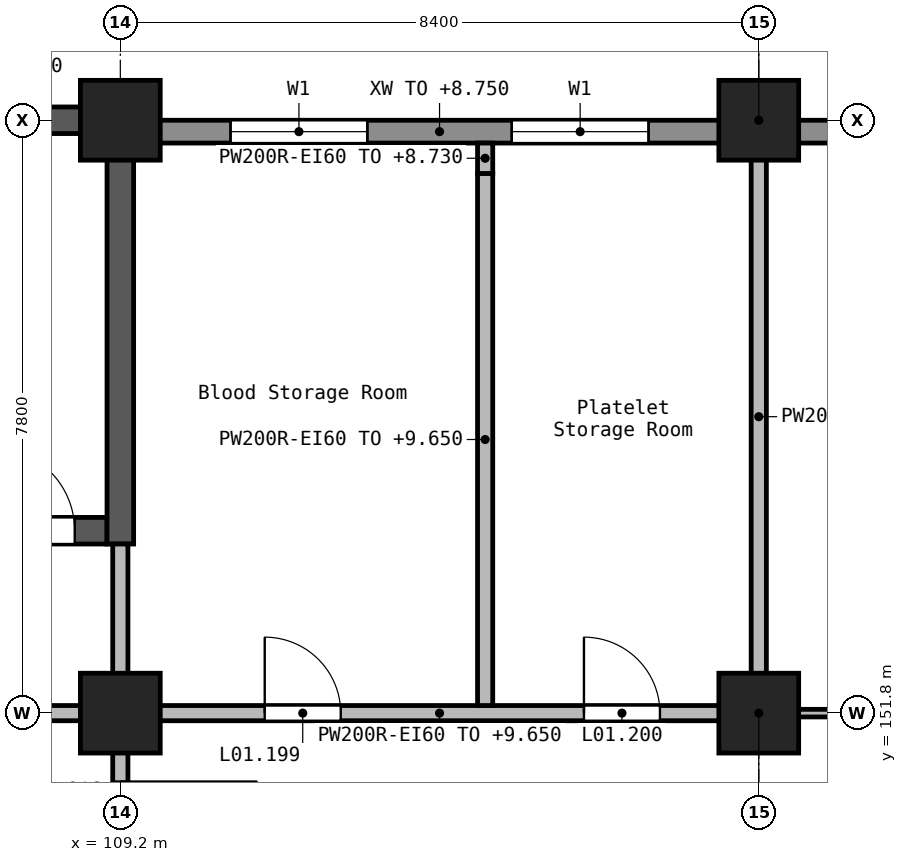
"""IFC4 building model, lengths in metres.
Left out: names, types, materials, properties, quantities, classifications, styles, units other than length and angle.
Written with IfcOpenShell. Run it as: python <this file> out.ifc"""

import sys

from ifc_helpers import new_model, si_unit, direction, frame, frame_2d, origin, origin_2d, place, context, subcontext, project, spatial, rectangle, extrude, element, fill, save


model = new_model("IFC4")
c1 = context("Model", 3, precision=1e-05, world=origin(), true_north=direction((0.0, 1.0)))
c2 = subcontext(c1, "Body", "Model", "MODEL_VIEW")
j1 = project(units=[si_unit("LENGTHUNIT", "METRE"), si_unit("PLANEANGLEUNIT", "RADIAN")], contexts=[c1])
p1 = place(None, origin())
s1 = spatial("IfcSite", under=j1, at=p1, CompositionType="ELEMENT")
p2 = place(p1, origin())
s2 = spatial("IfcBuilding", under=s1, at=p2, CompositionType="ELEMENT")
p3 = place(p2, frame((0.0, 0.0, 5.4)))
s3 = spatial("IfcBuildingStorey", under=s2, at=p3, CompositionType="ELEMENT", Elevation=5.4)
for number, where, z_axis, x_axis in (
    (1, (109.2, 151.8, 0.0), (0.0, 0.0, 1.0), (1.0, 0.0, 0.0)),
    (2, (109.2, 159.6, 0.0), (0.0, 0.0, 1.0), (1.0, 0.0, 0.0)),
    (3, (117.6, 151.8, 0.0), (0.0, 0.0, 1.0), (1.0, 0.0, 0.0)),
    (4, (117.6, 159.6, 0.0), (0.0, 0.0, 1.0), (1.0, 0.0, 0.0)),
):
    element("IfcColumn", number, at=place(p3, frame(where, z_axis=z_axis, x_axis=x_axis)), inside=s3, PredefinedType="COLUMN", context=c2, shape_type="SweptSolid", body=[
        extrude(rectangle(XDim=1.05, YDim=1.05, at=origin_2d()), origin(), (0.0, 0.0, 1.0), 4.5),
    ])
p4 = place(p3, frame((100.625, 159.6, 0.0), z_axis=(0.0, 0.0, 1.0), x_axis=(1.0, 0.0, 0.0)))
e5 = element("IfcWall", 5, at=p4, inside=s3, PredefinedType="SHEAR", context=c2, shape_type="SweptSolid", body=[
    extrude(rectangle(XDim=8.4, YDim=0.35, at=frame_2d((4.2, 0.0))), origin(), (0.0, 0.0, 1.0), 4.5),
])
p5 = place(p3, frame((100.975, 154.2, 0.0), z_axis=(0.0, 0.0, 1.0), x_axis=(1.0, 0.0, 0.0)))
e6 = element("IfcWall", 6, at=p5, inside=s3, PredefinedType="SHEAR", context=c2, shape_type="SweptSolid", body=[
    extrude(rectangle(XDim=8.05, YDim=0.35, at=frame_2d((4.025, 0.0))), origin(), (0.0, 0.0, 1.0), 4.5),
])
p6 = place(p5, frame((6.525, 0.0, 0.0)))
e7 = element("IfcOpeningElement", 7, at=p6, cuts=e6, PredefinedType="OPENING", context=c2, shape_type="SweptSolid", body=[
    extrude(rectangle(XDim=1.1, YDim=2.1, at=frame_2d((0.55, 1.05))), frame((0.0, 0.185, 0.0), z_axis=(0.0, -1.0, 0.0), x_axis=(1.0, 0.0, 0.0)), (0.0, 0.0, 1.0), 0.37),
])
p7 = place(p3, frame((109.2, 154.025, 0.0), z_axis=(0.0, 0.0, 1.0), x_axis=(0.0, 1.0, 0.0)))
e8 = element("IfcWall", 8, at=p7, inside=s3, PredefinedType="SHEAR", context=c2, shape_type="SweptSolid", body=[
    extrude(rectangle(XDim=5.75, YDim=0.35, at=frame_2d((2.875, 0.0))), origin(), (0.0, 0.0, 1.0), 4.5),
])
p8 = place(p3, frame((125.5, 159.45, 0.0), z_axis=(0.0, 0.0, 1.0), x_axis=(-1.0, 0.0, 0.0)))
e9 = element("IfcWall", 9, at=p8, inside=s3, PredefinedType="STANDARD", context=c2, shape_type="SweptSolid", body=[
    extrude(rectangle(XDim=7.4, YDim=0.3, at=frame_2d((3.7, 0.0))), origin(), (0.0, 0.0, 1.0), 3.35),
])
p9 = place(p8, frame((0.95, 0.0, 0.9)))
e10 = element("IfcOpeningElement", 10, at=p9, cuts=e9, PredefinedType="OPENING", context=c2, shape_type="SweptSolid", body=[
    extrude(rectangle(XDim=1.8, YDim=1.5, at=frame_2d((0.9, 0.75))), frame((0.0, 0.16, 0.0), z_axis=(0.0, -1.0, 0.0), x_axis=(1.0, 0.0, 0.0)), (0.0, 0.0, 1.0), 0.32),
])
p10 = place(p8, frame((4.65, 0.0, 0.9)))
e11 = element("IfcOpeningElement", 11, at=p10, cuts=e9, PredefinedType="OPENING", context=c2, shape_type="SweptSolid", body=[
    extrude(rectangle(XDim=1.8, YDim=1.5, at=frame_2d((0.9, 0.75))), frame((0.0, 0.16, 0.0), z_axis=(0.0, -1.0, 0.0), x_axis=(1.0, 0.0, 0.0)), (0.0, 0.0, 1.0), 0.32),
])
p11 = place(p3, frame((117.1, 159.45, 0.0), z_axis=(0.0, 0.0, 1.0), x_axis=(-1.0, 0.0, 0.0)))
e12 = element("IfcWall", 12, at=p11, inside=s3, PredefinedType="STANDARD", context=c2, shape_type="SweptSolid", body=[
    extrude(rectangle(XDim=7.4, YDim=0.3, at=frame_2d((3.7, 0.0))), origin(), (0.0, 0.0, 1.0), 3.35),
])
p12 = place(p11, frame((0.95, 0.0, 0.9)))
e13 = element("IfcOpeningElement", 13, at=p12, cuts=e12, PredefinedType="OPENING", context=c2, shape_type="SweptSolid", body=[
    extrude(rectangle(XDim=1.8, YDim=1.5, at=frame_2d((0.9, 0.75))), frame((0.0, 0.16, 0.0), z_axis=(0.0, -1.0, 0.0), x_axis=(1.0, 0.0, 0.0)), (0.0, 0.0, 1.0), 0.32),
])
p13 = place(p11, frame((4.65, 0.0, 0.9)))
e14 = element("IfcOpeningElement", 14, at=p13, cuts=e12, PredefinedType="OPENING", context=c2, shape_type="SweptSolid", body=[
    extrude(rectangle(XDim=1.8, YDim=1.5, at=frame_2d((0.9, 0.75))), frame((0.0, 0.16, 0.0), z_axis=(0.0, -1.0, 0.0), x_axis=(1.0, 0.0, 0.0)), (0.0, 0.0, 1.0), 0.32),
])
p14 = place(p3, frame((109.2, 154.025, 0.0), z_axis=(0.0, 0.0, 1.0), x_axis=(0.0, -1.0, 0.0)))
e15 = element("IfcWall", 15, at=p14, inside=s3, PredefinedType="SOLIDWALL", context=c2, shape_type="SweptSolid", body=[
    extrude(rectangle(XDim=1.725, YDim=0.2, at=frame_2d((0.862, 0.0))), origin(), (0.0, 0.0, 1.0), 4.25),
])
p15 = place(p3, frame((109.2, 151.3, 0.0), z_axis=(0.0, 0.0, 1.0), x_axis=(0.0, -1.0, 0.0)))
e16 = element("IfcWall", 16, at=p15, inside=s3, PredefinedType="SOLIDWALL", context=c2, shape_type="SweptSolid", body=[
    extrude(rectangle(XDim=2.6, YDim=0.2, at=frame_2d((1.3, 0.0))), origin(), (0.0, 0.0, 1.0), 4.25),
])
p16 = place(p15, frame((0.4, 0.0, 0.0)))
e17 = element("IfcOpeningElement", 17, at=p16, cuts=e16, PredefinedType="OPENING", context=c2, shape_type="SweptSolid", body=[
    extrude(rectangle(XDim=1.8, YDim=2.1, at=frame_2d((0.9, 1.05))), frame((0.0, 0.11, 0.0), z_axis=(0.0, -1.0, 0.0), x_axis=(1.0, 0.0, 0.0)), (0.0, 0.0, 1.0), 0.22),
])
p17 = place(p3, frame((101.3, 151.8, 0.0), z_axis=(0.0, 0.0, 1.0), x_axis=(1.0, 0.0, 0.0)))
e18 = element("IfcWall", 18, at=p17, inside=s3, PredefinedType="SOLIDWALL", context=c2, shape_type="SweptSolid", body=[
    extrude(rectangle(XDim=7.4, YDim=0.2, at=frame_2d((3.7, 0.0))), origin(), (0.0, 0.0, 1.0), 4.25),
])
p18 = place(p17, frame((3.15, 0.0, 0.0)))
e19 = element("IfcOpeningElement", 19, at=p18, cuts=e18, PredefinedType="OPENING", context=c2, shape_type="SweptSolid", body=[
    extrude(rectangle(XDim=1.1, YDim=2.1, at=frame_2d((0.55, 1.05))), frame((0.0, 0.11, 0.0), z_axis=(0.0, -1.0, 0.0), x_axis=(1.0, 0.0, 0.0)), (0.0, 0.0, 1.0), 0.22),
])
p19 = place(p3, frame((109.7, 151.8, 0.0), z_axis=(0.0, 0.0, 1.0), x_axis=(1.0, 0.0, 0.0)))
e20 = element("IfcWall", 20, at=p19, inside=s3, PredefinedType="SOLIDWALL", context=c2, shape_type="SweptSolid", body=[
    extrude(rectangle(XDim=7.4, YDim=0.2, at=frame_2d((3.7, 0.0))), origin(), (0.0, 0.0, 1.0), 4.25),
])
p20 = place(p19, frame((1.4, 0.0, 0.0)))
e21 = element("IfcOpeningElement", 21, at=p20, cuts=e20, PredefinedType="OPENING", context=c2, shape_type="SweptSolid", body=[
    extrude(rectangle(XDim=1.0, YDim=2.1, at=frame_2d((0.5, 1.05))), frame((0.0, 0.11, 0.0), z_axis=(0.0, -1.0, 0.0), x_axis=(1.0, 0.0, 0.0)), (0.0, 0.0, 1.0), 0.22),
])
p21 = place(p19, frame((5.6, 0.0, 0.0)))
e22 = element("IfcOpeningElement", 22, at=p21, cuts=e20, PredefinedType="OPENING", context=c2, shape_type="SweptSolid", body=[
    extrude(rectangle(XDim=1.0, YDim=2.1, at=frame_2d((0.5, 1.05))), frame((0.0, 0.11, 0.0), z_axis=(0.0, -1.0, 0.0), x_axis=(1.0, 0.0, 0.0)), (0.0, 0.0, 1.0), 0.22),
])
p22 = place(p3, frame((114.0, 151.9, 0.0), z_axis=(0.0, 0.0, 1.0), x_axis=(0.0, 1.0, 0.0)))
e23 = element("IfcWall", 23, at=p22, inside=s3, PredefinedType="SOLIDWALL", context=c2, shape_type="SweptSolid", body=[
    extrude(rectangle(XDim=7.0, YDim=0.2, at=frame_2d((3.5, 0.0))), origin(), (0.0, 0.0, 1.0), 4.25),
])
p23 = place(p3, frame((114.0, 158.9, 0.0), z_axis=(0.0, 0.0, 1.0), x_axis=(0.0, 1.0, 0.0)))
e24 = element("IfcWall", 24, at=p23, inside=s3, PredefinedType="SOLIDWALL", context=c2, shape_type="SweptSolid", body=[
    extrude(rectangle(XDim=0.4, YDim=0.2, at=frame_2d((0.2, 0.0))), origin(), (0.0, 0.0, 1.0), 3.33),
])
p24 = place(p3, frame((117.6, 152.3, 0.0), z_axis=(0.0, 0.0, 1.0), x_axis=(0.0, 1.0, 0.0)))
e25 = element("IfcWall", 25, at=p24, inside=s3, PredefinedType="SOLIDWALL", context=c2, shape_type="SweptSolid", body=[
    extrude(rectangle(XDim=6.8, YDim=0.2, at=frame_2d((3.4, 0.0))), origin(), (0.0, 0.0, 1.0), 4.25),
])
p25 = place(p3, frame((125.5, 151.8, 0.0), z_axis=(0.0, 0.0, 1.0), x_axis=(-1.0, 0.0, 0.0)))
e26 = element("IfcWall", 26, at=p25, inside=s3, PredefinedType="PARTITIONING", context=c2, shape_type="SweptSolid", body=[
    extrude(rectangle(XDim=7.4, YDim=0.1, at=frame_2d((3.7, 0.0))), origin(), (0.0, 0.0, 1.0), 4.25),
])
p26 = place(p25, frame((5.35, 0.0, 0.0)))
e27 = element("IfcOpeningElement", 27, at=p26, cuts=e26, PredefinedType="OPENING", context=c2, shape_type="SweptSolid", body=[
    extrude(rectangle(XDim=0.9, YDim=2.1, at=frame_2d((0.45, 1.05))), frame((0.0, 0.06, 0.0), z_axis=(0.0, -1.0, 0.0), x_axis=(1.0, 0.0, 0.0)), (0.0, 0.0, 1.0), 0.12),
])
p27 = place(p25, frame((0.1, 0.0, 0.0)))
e28 = element("IfcOpeningElement", 28, at=p27, cuts=e26, PredefinedType="OPENING", context=c2, shape_type="SweptSolid", body=[
    extrude(rectangle(XDim=1.8, YDim=2.1, at=frame_2d((0.9, 1.05))), frame((0.0, 0.06, 0.0), z_axis=(0.0, -1.0, 0.0), x_axis=(1.0, 0.0, 0.0)), (0.0, 0.0, 1.0), 0.12),
])
p28 = place(p12, origin())
e29 = element("IfcWindow", 29, at=p28, inside=s3, PartitioningType="SINGLE_PANEL", PredefinedType="WINDOW", context=c2, shape_type="SweptSolid", body=[
    extrude(rectangle(XDim=1.8, YDim=1.5, at=frame_2d((0.9, 0.75))), frame((0.0, 0.03, 0.0), z_axis=(0.0, -1.0, 0.0), x_axis=(1.0, 0.0, 0.0)), (0.0, 0.0, 1.0), 0.06),
])
fill(e13, e29)
p29 = place(p13, origin())
e30 = element("IfcWindow", 30, at=p29, inside=s3, PartitioningType="SINGLE_PANEL", PredefinedType="WINDOW", context=c2, shape_type="SweptSolid", body=[
    extrude(rectangle(XDim=1.8, YDim=1.5, at=frame_2d((0.9, 0.75))), frame((0.0, 0.03, 0.0), z_axis=(0.0, -1.0, 0.0), x_axis=(1.0, 0.0, 0.0)), (0.0, 0.0, 1.0), 0.06),
])
fill(e14, e30)
p30 = place(p16, frame((1.8, 0.0, 0.0), z_axis=(0.0, 0.0, 1.0), x_axis=(-1.0, 0.0, 0.0)))
e31 = element("IfcDoor", 31, at=p30, inside=s3, OperationType="DOUBLE_DOOR_SINGLE_SWING", PredefinedType="DOOR", context=c2, shape_type="SweptSolid", body=[
    extrude(rectangle(XDim=1.8, YDim=2.1, at=frame_2d((0.9, 1.05))), frame((0.0, 0.025, 0.0), z_axis=(0.0, -1.0, 0.0), x_axis=(1.0, 0.0, 0.0)), (0.0, 0.0, 1.0), 0.05),
])
fill(e17, e31)
p31 = place(p6, origin())
e32 = element("IfcDoor", 32, at=p31, inside=s3, OperationType="SINGLE_SWING_RIGHT", PredefinedType="DOOR", context=c2, shape_type="SweptSolid", body=[
    extrude(rectangle(XDim=1.1, YDim=2.1, at=frame_2d((0.55, 1.05))), frame((0.0, 0.025, 0.0), z_axis=(0.0, -1.0, 0.0), x_axis=(1.0, 0.0, 0.0)), (0.0, 0.0, 1.0), 0.05),
])
fill(e7, e32)
p32 = place(p20, origin())
e33 = element("IfcDoor", 33, at=p32, inside=s3, OperationType="SINGLE_SWING_LEFT", PredefinedType="DOOR", context=c2, shape_type="SweptSolid", body=[
    extrude(rectangle(XDim=1.0, YDim=2.1, at=frame_2d((0.5, 1.05))), frame((0.0, 0.025, 0.0), z_axis=(0.0, -1.0, 0.0), x_axis=(1.0, 0.0, 0.0)), (0.0, 0.0, 1.0), 0.05),
])
fill(e21, e33)
p33 = place(p21, origin())
e34 = element("IfcDoor", 34, at=p33, inside=s3, OperationType="SINGLE_SWING_RIGHT", PredefinedType="DOOR", context=c2, shape_type="SweptSolid", body=[
    extrude(rectangle(XDim=1.0, YDim=2.1, at=frame_2d((0.5, 1.05))), frame((0.0, 0.025, 0.0), z_axis=(0.0, -1.0, 0.0), x_axis=(1.0, 0.0, 0.0)), (0.0, 0.0, 1.0), 0.05),
])
fill(e22, e34)
save(model, sys.argv[1])
